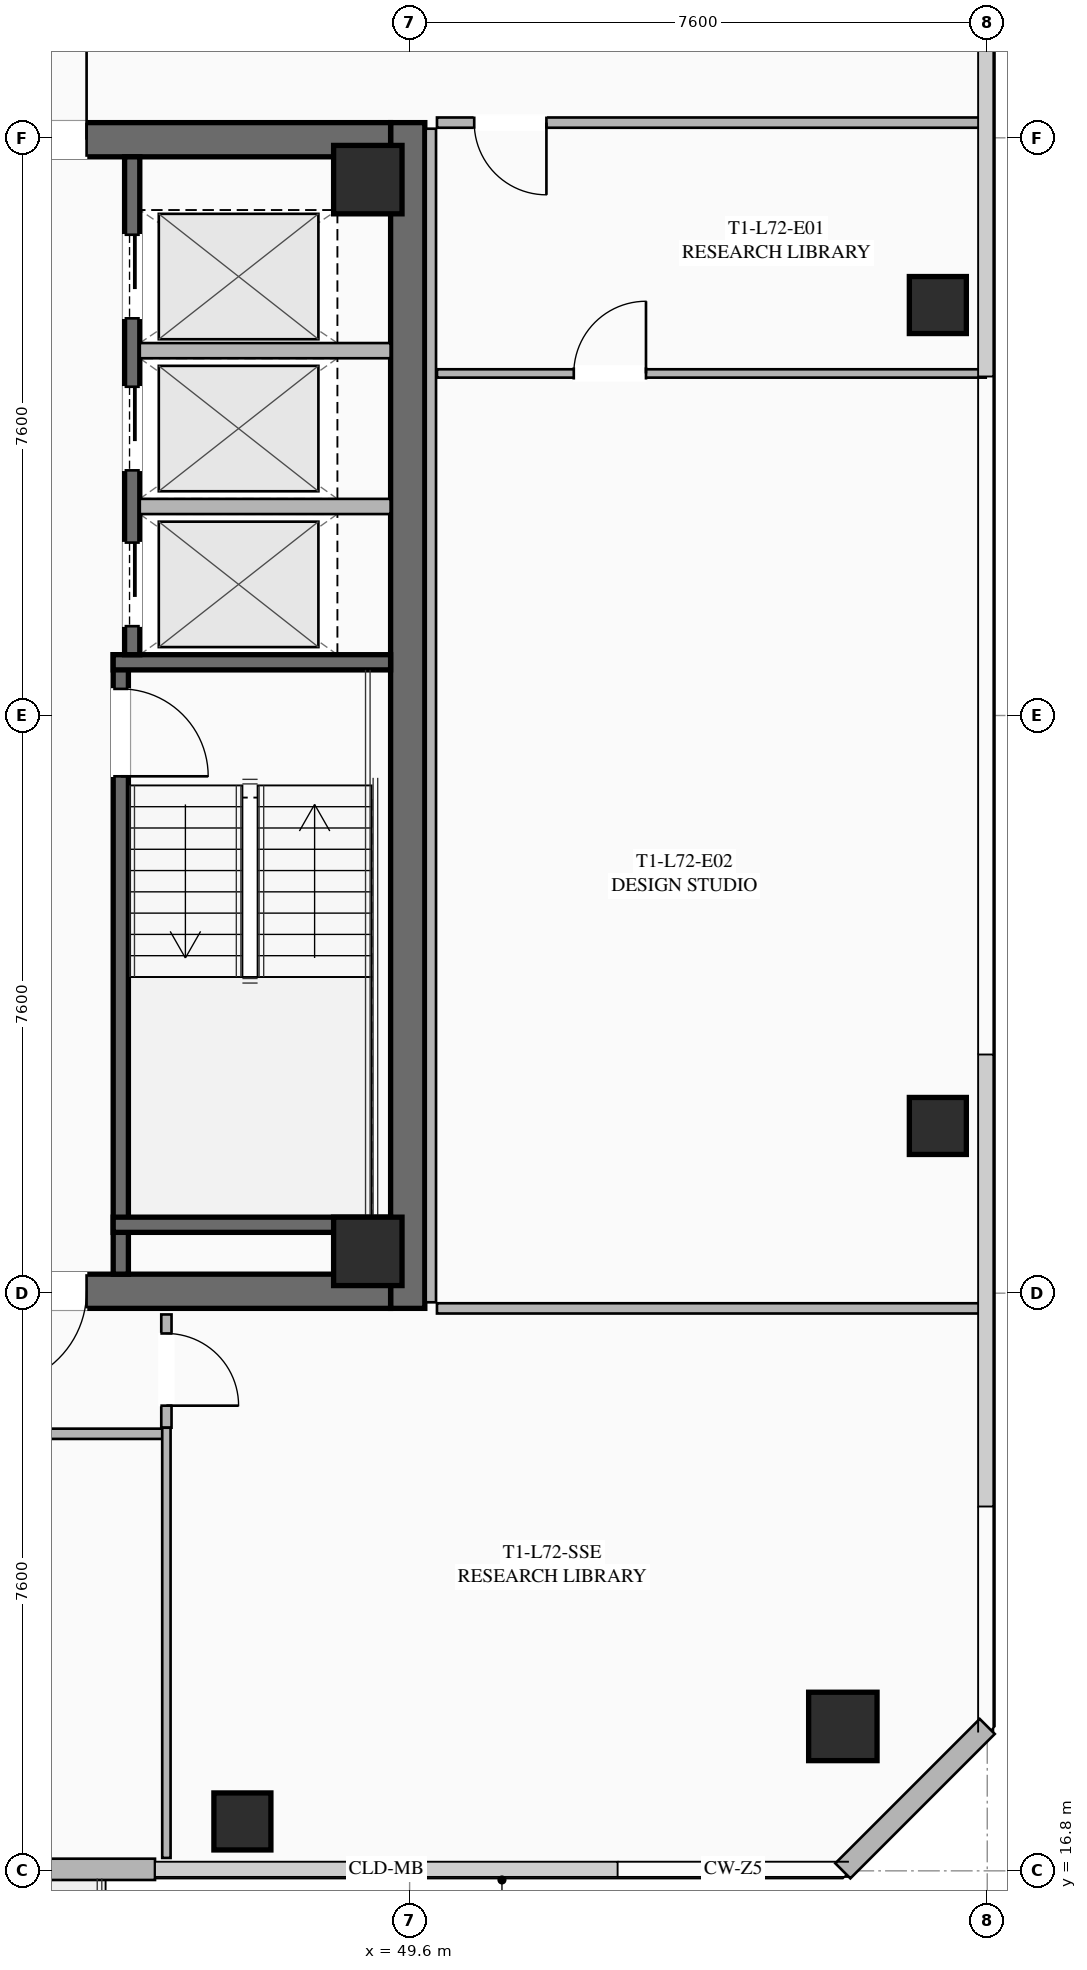
"""IFC4 building model, lengths in metres.
Left out: names, types, materials, properties, quantities, classifications, styles, units other than length and angle.
Written with IfcOpenShell. Run it as: python <this file> out.ifc"""

import sys

from ifc_helpers import new_model, si_unit, direction, frame, frame_2d, origin, origin_2d, place, context, subcontext, project, spatial, rectangle, hollow_rectangle, extrude, element, fill, save


model = new_model("IFC4")
c1 = context("Model", 3, precision=1e-05, world=origin(), true_north=direction((0.0, 1.0)))
c2 = subcontext(c1, "Body", "Model", "MODEL_VIEW")
j1 = project(units=[si_unit("LENGTHUNIT", "METRE"), si_unit("PLANEANGLEUNIT", "RADIAN")], contexts=[c1])
p1 = place(None, origin())
s1 = spatial("IfcSite", under=j1, at=p1, CompositionType="ELEMENT")
p2 = place(p1, origin())
s2 = spatial("IfcBuilding", under=s1, at=p2, CompositionType="ELEMENT")
p3 = place(p2, frame((0.0, 0.0, 266.95)))
s3 = spatial("IfcBuildingStorey", under=s2, at=p3, CompositionType="ELEMENT", Elevation=266.95)
p4 = place(p3, frame((49.575, 39.8, 0.0), z_axis=(0.0, 0.0, 1.0), x_axis=(0.0, -1.0, 0.0)))
e1 = element("IfcWall", 1, at=p4, inside=s3, PredefinedType="SHEAR", context=c2, shape_type="SweptSolid", body=[
    extrude(rectangle(XDim=15.6, YDim=0.45, at=frame_2d((7.8, 0.0))), origin(), (0.0, 0.0, 1.0), 3.55),
])
p5 = place(p3, frame((49.35, 24.425, 0.0), z_axis=(0.0, 0.0, 1.0), x_axis=(-1.0, 0.0, 0.0)))
e2 = element("IfcWall", 2, at=p5, inside=s3, PredefinedType="SHEAR", context=c2, shape_type="SweptSolid", body=[
    extrude(rectangle(XDim=14.7, YDim=0.45, at=frame_2d((7.35, 0.0))), origin(), (0.0, 0.0, 1.0), 3.55),
])
p6 = place(p5, frame((9.05, 0.0, 0.0)))
e3 = element("IfcOpeningElement", 3, at=p6, cuts=e2, PredefinedType="OPENING", context=c2, shape_type="SweptSolid", body=[
    extrude(rectangle(XDim=1.25, YDim=2.25, at=frame_2d((0.625, 1.125))), frame((0.0, 0.235, 0.0), z_axis=(0.0, -1.0, 0.0), x_axis=(1.0, 0.0, 0.0)), (0.0, 0.0, 1.0), 0.47),
])
p7 = place(p5, frame((4.0, 0.0, 0.0)))
e4 = element("IfcOpeningElement", 4, at=p7, cuts=e2, PredefinedType="OPENING", context=c2, shape_type="SweptSolid", body=[
    extrude(rectangle(XDim=1.25, YDim=2.25, at=frame_2d((0.625, 1.125))), frame((0.0, 0.235, 0.0), z_axis=(0.0, -1.0, 0.0), x_axis=(1.0, 0.0, 0.0)), (0.0, 0.0, 1.0), 0.47),
])
p8 = place(p3, frame((34.65, 39.575, 0.0), z_axis=(0.0, 0.0, 1.0), x_axis=(1.0, 0.0, 0.0)))
e5 = element("IfcWall", 5, at=p8, inside=s3, PredefinedType="SHEAR", context=c2, shape_type="SweptSolid", body=[
    extrude(rectangle(XDim=14.7, YDim=0.45, at=frame_2d((7.35, 0.0))), origin(), (0.0, 0.0, 1.0), 3.55),
])
p9 = place(p8, frame((4.4, 0.0, 0.0)))
e6 = element("IfcOpeningElement", 6, at=p9, cuts=e5, PredefinedType="OPENING", context=c2, shape_type="SweptSolid", body=[
    extrude(rectangle(XDim=1.25, YDim=2.25, at=frame_2d((0.625, 1.125))), frame((0.0, 0.235, 0.0), z_axis=(0.0, -1.0, 0.0), x_axis=(1.0, 0.0, 0.0)), (0.0, 0.0, 1.0), 0.47),
])
p10 = place(p8, frame((9.45, 0.0, 0.0)))
e7 = element("IfcOpeningElement", 7, at=p10, cuts=e5, PredefinedType="OPENING", context=c2, shape_type="SweptSolid", body=[
    extrude(rectangle(XDim=1.25, YDim=2.25, at=frame_2d((0.625, 1.125))), frame((0.0, 0.235, 0.0), z_axis=(0.0, -1.0, 0.0), x_axis=(1.0, 0.0, 0.0)), (0.0, 0.0, 1.0), 0.47),
])
for number, where, z_axis, x_axis in (
    (8, (49.05, 24.95, 0.0), (0.0, 0.0, 1.0), (1.0, 0.0, 0.0)),
    (9, (49.05, 39.05, 0.0), (0.0, 0.0, 1.0), (1.0, 0.0, 0.0)),
    (10, (55.3, 18.7, 0.0), (0.0, 0.0, 1.0), (1.0, 0.0, 0.0)),
):
    element("IfcColumn", number, at=place(p3, frame(where, z_axis=z_axis, x_axis=x_axis)), inside=s3, PredefinedType="COLUMN", context=c2, shape_type="SweptSolid", body=[
        extrude(hollow_rectangle(XDim=0.9, YDim=0.9, WallThickness=0.04, at=origin_2d()), origin(), (0.0, 0.0, 1.0), 3.37),
    ])
for number, where, z_axis, x_axis in (
    (11, (47.4, 17.45, 0.0), (0.0, 0.0, 1.0), (1.0, 0.0, 0.0)),
    (12, (56.55, 26.6, 0.0), (0.0, 0.0, 1.0), (1.0, 0.0, 0.0)),
    (13, (56.55, 37.4, 0.0), (0.0, 0.0, 1.0), (1.0, 0.0, 0.0)),
):
    element("IfcColumn", number, at=place(p3, frame(where, z_axis=z_axis, x_axis=x_axis)), inside=s3, PredefinedType="COLUMN", context=c2, shape_type="SweptSolid", body=[
        extrude(hollow_rectangle(XDim=0.75, YDim=0.75, WallThickness=0.032, at=origin_2d()), origin(), (0.0, 0.0, 1.0), 3.37),
    ])
p11 = place(p3, frame((46.25, 16.82, 0.0), z_axis=(0.0, 0.0, 1.0), x_axis=(-1.0, 0.0, 0.0)))
e14 = element("IfcWall", 14, at=p11, inside=s3, PredefinedType="SOLIDWALL", context=c2, shape_type="SweptSolid", body=[
    extrude(rectangle(XDim=8.5, YDim=0.28, at=frame_2d((4.25, 0.0))), origin(), (0.0, 0.0, 1.0), 3.37),
])
p12 = place(p11, frame((3.6, 0.0, 0.0)))
e15 = element("IfcOpeningElement", 15, at=p12, cuts=e14, PredefinedType="OPENING", context=c2, shape_type="SweptSolid", body=[
    extrude(rectangle(XDim=1.3, YDim=2.15, at=frame_2d((0.65, 1.075))), frame((0.0, 0.15, 0.0), z_axis=(0.0, -1.0, 0.0), x_axis=(1.0, 0.0, 0.0)), (0.0, 0.0, 1.0), 0.3),
])
p13 = place(p11, frame((1.46, 0.0, 0.85)))
e16 = element("IfcOpeningElement", 16, at=p13, cuts=e14, PredefinedType="OPENING", context=c2, shape_type="SweptSolid", body=[
    extrude(rectangle(XDim=1.8, YDim=1.92, at=frame_2d((0.9, 0.96))), frame((0.0, 0.15, 0.0), z_axis=(0.0, -1.0, 0.0), x_axis=(1.0, 0.0, 0.0)), (0.0, 0.0, 1.0), 0.3),
])
p14 = place(p3, frame((57.2, 18.7, 0.0), z_axis=(0.0, 0.0, 1.0), x_axis=(-0.707106781187, -0.707106781187, 0.0)))
e17 = element("IfcWall", 17, at=p14, inside=s3, PredefinedType="SOLIDWALL", context=c2, shape_type="SweptSolid", body=[
    extrude(rectangle(XDim=2.687, YDim=0.28, at=frame_2d((1.343, 0.0))), origin(), (0.0, 0.0, 1.0), 3.37),
])
p15 = place(p3, frame((45.8, 32.8, 0.0), z_axis=(0.0, 0.0, 1.0), x_axis=(0.0, -1.0, 0.0)))
e18 = element("IfcWall", 18, at=p15, inside=s3, PredefinedType="SHEAR", context=c2, shape_type="SweptSolid", body=[
    extrude(rectangle(XDim=8.15, YDim=0.2, at=frame_2d((4.075, 0.0))), origin(), (0.0, 0.0, 1.0), 3.37),
])
p16 = place(p15, frame((0.45, 0.0, 0.0)))
e19 = element("IfcOpeningElement", 19, at=p16, cuts=e18, PredefinedType="OPENING", context=c2, shape_type="SweptSolid", body=[
    extrude(rectangle(XDim=1.15, YDim=2.2, at=frame_2d((0.575, 1.1))), frame((0.0, 0.11, 0.0), z_axis=(0.0, -1.0, 0.0), x_axis=(1.0, 0.0, 0.0)), (0.0, 0.0, 1.0), 0.22),
])
for number, where, z_axis, x_axis in (
    (20, (45.7, 32.7, 0.0), (0.0, 0.0, 1.0), (1.0, 0.0, 0.0)),
    (21, (45.7, 25.3, 0.0), (0.0, 0.0, 1.0), (1.0, 0.0, 0.0)),
):
    element("IfcWall", number, at=place(p3, frame(where, z_axis=z_axis, x_axis=x_axis)), inside=s3, PredefinedType="SHEAR", context=c2, shape_type="SweptSolid", body=[
        extrude(rectangle(XDim=3.65, YDim=0.2, at=frame_2d((1.825, 0.0))), origin(), (0.0, 0.0, 1.0), 3.37),
    ])
p17 = place(p3, frame((45.95, 39.35, 0.0), z_axis=(0.0, 0.0, 1.0), x_axis=(0.0, -1.0, 0.0)))
e22 = element("IfcWall", 22, at=p17, inside=s3, PredefinedType="SHEAR", context=c2, shape_type="SweptSolid", body=[
    extrude(rectangle(XDim=6.55, YDim=0.2, at=frame_2d((3.275, 0.0))), origin(), (0.0, 0.0, 1.0), 3.37),
])
p18 = place(p17, frame((5.075, 0.0, 0.0)))
e23 = element("IfcOpeningElement", 23, at=p18, cuts=e22, PredefinedType="OPENING", context=c2, shape_type="SweptSolid", body=[
    extrude(rectangle(XDim=1.1, YDim=2.2, at=frame_2d((0.55, 1.1))), frame((0.0, 0.11, 0.0), z_axis=(0.0, -1.0, 0.0), x_axis=(1.0, 0.0, 0.0)), (0.0, 0.0, 1.0), 0.22),
])
p19 = place(p17, frame((3.025, 0.0, 0.0)))
e24 = element("IfcOpeningElement", 24, at=p19, cuts=e22, PredefinedType="OPENING", context=c2, shape_type="SweptSolid", body=[
    extrude(rectangle(XDim=1.1, YDim=2.2, at=frame_2d((0.55, 1.1))), frame((0.0, 0.11, 0.0), z_axis=(0.0, -1.0, 0.0), x_axis=(1.0, 0.0, 0.0)), (0.0, 0.0, 1.0), 0.22),
])
p20 = place(p17, frame((1.025, 0.0, 0.0)))
e25 = element("IfcOpeningElement", 25, at=p20, cuts=e22, PredefinedType="OPENING", context=c2, shape_type="SweptSolid", body=[
    extrude(rectangle(XDim=1.1, YDim=2.2, at=frame_2d((0.55, 1.1))), frame((0.0, 0.11, 0.0), z_axis=(0.0, -1.0, 0.0), x_axis=(1.0, 0.0, 0.0)), (0.0, 0.0, 1.0), 0.22),
])
for number, where, z_axis, x_axis in (
    (26, (46.05, 34.75, 0.0), (0.0, 0.0, 1.0), (1.0, 0.0, 0.0)),
    (27, (46.05, 36.8, 0.0), (0.0, 0.0, 1.0), (1.0, 0.0, 0.0)),
):
    element("IfcWall", number, at=place(p3, frame(where, z_axis=z_axis, x_axis=x_axis)), inside=s3, PredefinedType="SOLIDWALL", context=c2, shape_type="SweptSolid", body=[
        extrude(rectangle(XDim=3.3, YDim=0.2, at=frame_2d((1.65, 0.0))), origin(), (0.0, 0.0, 1.0), 3.37),
    ])
p21 = place(p3, frame((46.4, 22.55, 0.0), z_axis=(0.0, 0.0, 1.0), x_axis=(-1.0, 0.0, 0.0)))
e28 = element("IfcWall", 28, at=p21, inside=s3, PredefinedType="PARTITIONING", context=c2, shape_type="SweptSolid", body=[
    extrude(rectangle(XDim=17.55, YDim=0.135, at=frame_2d((8.775, 0.0))), origin(), (0.0, 0.0, 1.0), 2.723),
])
p22 = place(p21, frame((16.22, 0.0, 0.0)))
e29 = element("IfcOpeningElement", 29, at=p22, cuts=e28, PredefinedType="OPENING", context=c2, shape_type="SweptSolid", body=[
    extrude(rectangle(XDim=0.95, YDim=2.05, at=frame_2d((0.475, 1.025))), frame((0.0, 0.077, 0.0), z_axis=(0.0, -1.0, 0.0), x_axis=(1.0, 0.0, 0.0)), (0.0, 0.0, 1.0), 0.155),
])
p23 = place(p21, frame((3.672, 0.0, 0.0)))
e30 = element("IfcOpeningElement", 30, at=p23, cuts=e28, PredefinedType="OPENING", context=c2, shape_type="SweptSolid", body=[
    extrude(rectangle(XDim=0.95, YDim=2.05, at=frame_2d((0.475, 1.025))), frame((0.0, 0.077, 0.0), z_axis=(0.0, -1.0, 0.0), x_axis=(1.0, 0.0, 0.0)), (0.0, 0.0, 1.0), 0.155),
])
p24 = place(p3, frame((46.4, 24.12, 0.0), z_axis=(0.0, 0.0, 1.0), x_axis=(0.0, -1.0, 0.0)))
e31 = element("IfcWall", 31, at=p24, inside=s3, PredefinedType="PARTITIONING", context=c2, shape_type="SweptSolid", body=[
    extrude(rectangle(XDim=1.49, YDim=0.135, at=frame_2d((0.745, 0.0))), origin(), (0.0, 0.0, 1.0), 2.723),
])
p25 = place(p24, frame((0.25, 0.0, 0.0)))
e32 = element("IfcOpeningElement", 32, at=p25, cuts=e31, PredefinedType="OPENING", context=c2, shape_type="SweptSolid", body=[
    extrude(rectangle(XDim=0.95, YDim=2.05, at=frame_2d((0.475, 1.025))), frame((0.0, 0.077, 0.0), z_axis=(0.0, -1.0, 0.0), x_axis=(1.0, 0.0, 0.0)), (0.0, 0.0, 1.0), 0.155),
])
p26 = place(p3, frame((46.4, 16.97, 0.0), z_axis=(0.0, 0.0, 1.0), x_axis=(0.0, 1.0, 0.0)))
e33 = element("IfcWall", 33, at=p26, inside=s3, PredefinedType="PARTITIONING", context=c2, shape_type="SweptSolid", body=[
    extrude(rectangle(XDim=5.66, YDim=0.11, at=frame_2d((2.83, 0.0))), origin(), (0.0, 0.0, 1.0), 2.723),
])
p27 = place(p3, frame((49.88, 39.72, 0.0), z_axis=(0.0, 0.0, 1.0), x_axis=(0.0, -1.0, 0.0)))
e34 = element("IfcWall", 34, at=p27, inside=s3, PredefinedType="PARTITIONING", context=c2, shape_type="SweptSolid", body=[
    extrude(rectangle(XDim=15.44, YDim=0.135, at=frame_2d((7.72, 0.0))), origin(), (0.0, 0.0, 1.0), 2.723),
])
p28 = place(p3, frame((57.18, 39.8, 0.0), z_axis=(0.0, 0.0, 1.0), x_axis=(-1.0, 0.0, 0.0)))
e35 = element("IfcWall", 35, at=p28, inside=s3, PredefinedType="PARTITIONING", context=c2, shape_type="SweptSolid", body=[
    extrude(rectangle(XDim=7.22, YDim=0.135, at=frame_2d((3.61, 0.0))), origin(), (0.0, 0.0, 1.0), 2.723),
])
p29 = place(p28, frame((5.78, 0.0, 0.0)))
e36 = element("IfcOpeningElement", 36, at=p29, cuts=e35, PredefinedType="OPENING", context=c2, shape_type="SweptSolid", body=[
    extrude(rectangle(XDim=0.95, YDim=2.05, at=frame_2d((0.475, 1.025))), frame((0.0, 0.077, 0.0), z_axis=(0.0, -1.0, 0.0), x_axis=(1.0, 0.0, 0.0)), (0.0, 0.0, 1.0), 0.155),
])
p30 = place(p3, frame((49.96, 24.2, 0.0), z_axis=(0.0, 0.0, 1.0), x_axis=(1.0, 0.0, 0.0)))
e37 = element("IfcWall", 37, at=p30, inside=s3, PredefinedType="PARTITIONING", context=c2, shape_type="SweptSolid", body=[
    extrude(rectangle(XDim=7.22, YDim=0.135, at=frame_2d((3.61, 0.0))), origin(), (0.0, 0.0, 1.0), 2.723),
])
p31 = place(p3, frame((49.96, 36.5, 0.0), z_axis=(0.0, 0.0, 1.0), x_axis=(1.0, 0.0, 0.0)))
e38 = element("IfcWall", 38, at=p31, inside=s3, PredefinedType="PARTITIONING", context=c2, shape_type="SweptSolid", body=[
    extrude(rectangle(XDim=7.22, YDim=0.11, at=frame_2d((3.61, 0.0))), origin(), (0.0, 0.0, 1.0), 2.723),
])
p32 = place(p31, frame((1.8, 0.0, 0.0)))
e39 = element("IfcOpeningElement", 39, at=p32, cuts=e38, PredefinedType="OPENING", context=c2, shape_type="SweptSolid", body=[
    extrude(rectangle(XDim=0.95, YDim=2.05, at=frame_2d((0.475, 1.025))), frame((0.0, 0.065, 0.0), z_axis=(0.0, -1.0, 0.0), x_axis=(1.0, 0.0, 0.0)), (0.0, 0.0, 1.0), 0.13),
])
p33 = place(p10, origin())
e40 = element("IfcDoor", 40, at=p33, inside=s3, OperationType="SINGLE_SWING_RIGHT", PredefinedType="DOOR", context=c2, shape_type="SweptSolid", body=[
    extrude(rectangle(XDim=1.25, YDim=2.25, at=frame_2d((0.625, 1.125))), frame((0.0, 0.025, 0.0), z_axis=(0.0, -1.0, 0.0), x_axis=(1.0, 0.0, 0.0)), (0.0, 0.0, 1.0), 0.05),
])
fill(e7, e40)
p34 = place(p7, origin())
e41 = element("IfcDoor", 41, at=p34, inside=s3, OperationType="SINGLE_SWING_RIGHT", PredefinedType="DOOR", context=c2, shape_type="SweptSolid", body=[
    extrude(rectangle(XDim=1.25, YDim=2.25, at=frame_2d((0.625, 1.125))), frame((0.0, 0.025, 0.0), z_axis=(0.0, -1.0, 0.0), x_axis=(1.0, 0.0, 0.0)), (0.0, 0.0, 1.0), 0.05),
])
fill(e4, e41)
p35 = place(p16, origin())
e42 = element("IfcDoor", 42, at=p35, inside=s3, OperationType="SINGLE_SWING_RIGHT", PredefinedType="DOOR", context=c2, shape_type="SweptSolid", body=[
    extrude(rectangle(XDim=1.15, YDim=2.2, at=frame_2d((0.575, 1.1))), frame((0.0, 0.025, 0.0), z_axis=(0.0, -1.0, 0.0), x_axis=(1.0, 0.0, 0.0)), (0.0, 0.0, 1.0), 0.05),
])
fill(e19, e42)
p36 = place(p25, origin())
e43 = element("IfcDoor", 43, at=p36, inside=s3, OperationType="SINGLE_SWING_RIGHT", PredefinedType="DOOR", context=c2, shape_type="SweptSolid", body=[
    extrude(rectangle(XDim=0.95, YDim=2.05, at=frame_2d((0.475, 1.025))), frame((0.0, 0.025, 0.0), z_axis=(0.0, -1.0, 0.0), x_axis=(1.0, 0.0, 0.0)), (0.0, 0.0, 1.0), 0.05),
])
fill(e32, e43)
p37 = place(p29, origin())
e44 = element("IfcDoor", 44, at=p37, inside=s3, OperationType="SINGLE_SWING_LEFT", PredefinedType="DOOR", context=c2, shape_type="SweptSolid", body=[
    extrude(rectangle(XDim=0.95, YDim=2.05, at=frame_2d((0.475, 1.025))), frame((0.0, 0.025, 0.0), z_axis=(0.0, -1.0, 0.0), x_axis=(1.0, 0.0, 0.0)), (0.0, 0.0, 1.0), 0.05),
])
fill(e36, e44)
p38 = place(p32, origin())
e45 = element("IfcDoor", 45, at=p38, inside=s3, OperationType="SINGLE_SWING_RIGHT", PredefinedType="DOOR", context=c2, shape_type="SweptSolid", body=[
    extrude(rectangle(XDim=0.95, YDim=2.05, at=frame_2d((0.475, 1.025))), frame((0.0, 0.025, 0.0), z_axis=(0.0, -1.0, 0.0), x_axis=(1.0, 0.0, 0.0)), (0.0, 0.0, 1.0), 0.05),
])
fill(e39, e45)
p39 = place(p18, origin())
e46 = element("IfcDoor", 46, at=p39, inside=s3, OperationType="SLIDING_TO_LEFT", PredefinedType="DOOR", context=c2, shape_type="SweptSolid", body=[
    extrude(rectangle(XDim=1.1, YDim=2.2, at=frame_2d((0.55, 1.1))), frame((0.0, 0.025, 0.0), z_axis=(0.0, -1.0, 0.0), x_axis=(1.0, 0.0, 0.0)), (0.0, 0.0, 1.0), 0.05),
])
fill(e23, e46)
p40 = place(p19, origin())
e47 = element("IfcDoor", 47, at=p40, inside=s3, OperationType="SLIDING_TO_LEFT", PredefinedType="DOOR", context=c2, shape_type="SweptSolid", body=[
    extrude(rectangle(XDim=1.1, YDim=2.2, at=frame_2d((0.55, 1.1))), frame((0.0, 0.025, 0.0), z_axis=(0.0, -1.0, 0.0), x_axis=(1.0, 0.0, 0.0)), (0.0, 0.0, 1.0), 0.05),
])
fill(e24, e47)
p41 = place(p20, origin())
e48 = element("IfcDoor", 48, at=p41, inside=s3, OperationType="SLIDING_TO_LEFT", PredefinedType="DOOR", context=c2, shape_type="SweptSolid", body=[
    extrude(rectangle(XDim=1.1, YDim=2.2, at=frame_2d((0.55, 1.1))), frame((0.0, 0.025, 0.0), z_axis=(0.0, -1.0, 0.0), x_axis=(1.0, 0.0, 0.0)), (0.0, 0.0, 1.0), 0.05),
])
fill(e25, e48)
save(model, sys.argv[1])
